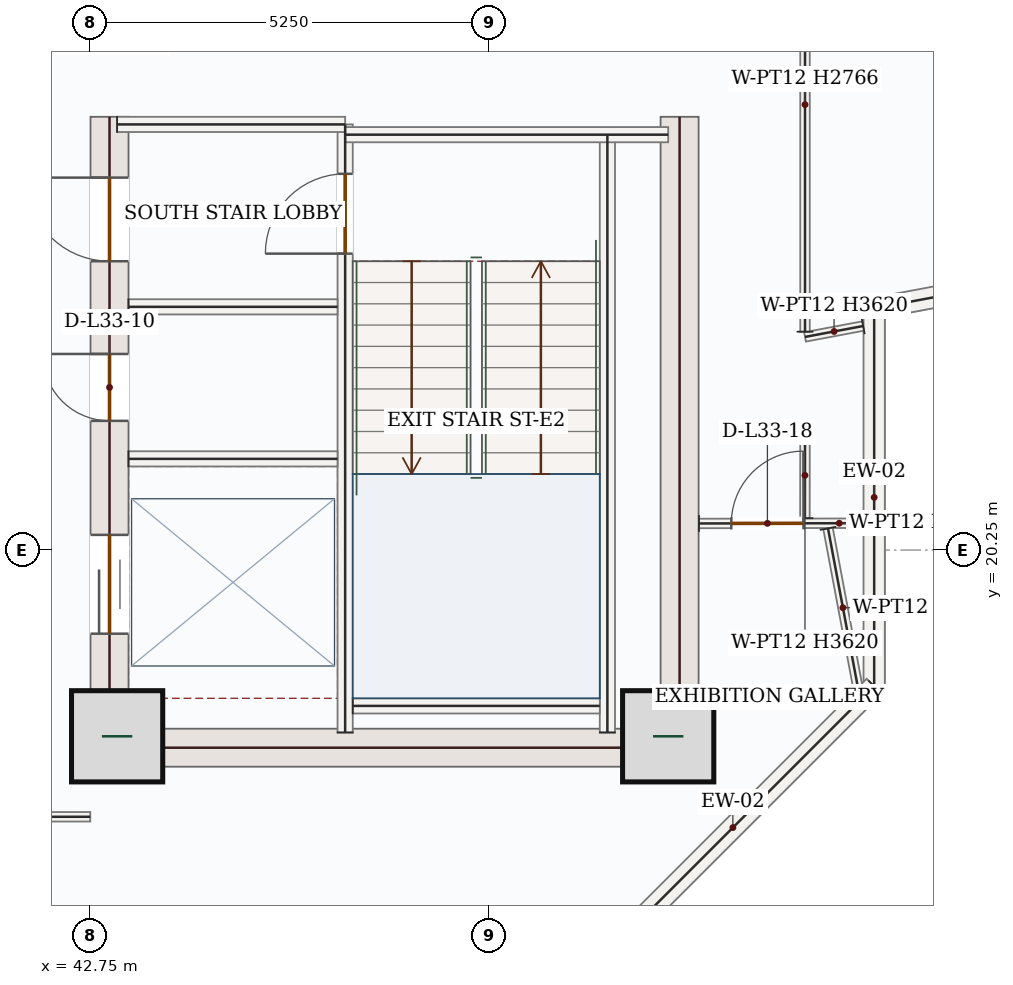
"""IFC4 building model, lengths in metres.
Left out: names, types, materials, properties, quantities, classifications, styles, units other than length and angle.
Written with IfcOpenShell. Run it as: python <this file> out.ifc"""

import sys

from ifc_helpers import new_model, si_unit, direction, frame, frame_2d, origin, origin_2d, place, context, subcontext, project, spatial, rectangle, extrude, source, transform, mapped, element, fill, save


model = new_model("IFC4")
c1 = context("Model", 3, precision=1e-05, world=origin(), true_north=direction((0.0, 1.0)))
c2 = subcontext(c1, "Body", "Model", "MODEL_VIEW")
j1 = project(units=[si_unit("LENGTHUNIT", "METRE"), si_unit("PLANEANGLEUNIT", "RADIAN")], contexts=[c1])
p1 = place(None, origin())
s1 = spatial("IfcSite", under=j1, at=p1, CompositionType="ELEMENT")
p2 = place(p1, origin())
s2 = spatial("IfcBuilding", under=s1, at=p2, CompositionType="ELEMENT")
p3 = place(p2, frame((0.0, 0.0, 147.3)))
s3 = spatial("IfcBuildingStorey", under=s2, at=p3, CompositionType="ELEMENT", Elevation=147.3)
p4 = place(p3, frame((43.0, 17.4, 0.0), z_axis=(0.0, 0.0, 1.0), x_axis=(0.0, 1.0, 0.0)))
e1 = element("IfcWall", 1, at=p4, inside=s3, PredefinedType="SHEAR", context=c2, shape_type="SweptSolid", body=[
    extrude(rectangle(XDim=8.55, YDim=0.5, at=frame_2d((4.275, 0.0))), origin(), (0.0, 0.0, 1.0), 3.62),
])
p5 = place(p4, frame((6.65, 0.0, 0.0)))
e2 = element("IfcOpeningElement", 2, at=p5, cuts=e1, PredefinedType="OPENING", context=c2, shape_type="SweptSolid", body=[
    extrude(rectangle(XDim=1.1, YDim=2.2, at=frame_2d((0.55, 1.1))), frame((0.0, 0.26, 0.0), z_axis=(0.0, -1.0, 0.0), x_axis=(1.0, 0.0, 0.0)), (0.0, 0.0, 1.0), 0.52),
])
p6 = place(p4, frame((1.75, 0.0, 0.0)))
e3 = element("IfcOpeningElement", 3, at=p6, cuts=e1, PredefinedType="OPENING", context=c2, shape_type="SweptSolid", body=[
    extrude(rectangle(XDim=1.3, YDim=2.2, at=frame_2d((0.65, 1.1))), frame((0.0, 0.26, 0.0), z_axis=(0.0, -1.0, 0.0), x_axis=(1.0, 0.0, 0.0)), (0.0, 0.0, 1.0), 0.52),
])
p7 = place(p4, frame((4.55, 0.0, 0.0)))
e4 = element("IfcOpeningElement", 4, at=p7, cuts=e1, PredefinedType="OPENING", context=c2, shape_type="SweptSolid", body=[
    extrude(rectangle(XDim=0.88, YDim=2.1, at=frame_2d((0.44, 1.05))), frame((0.0, 0.26, 0.0), z_axis=(0.0, -1.0, 0.0), x_axis=(1.0, 0.0, 0.0)), (0.0, 0.0, 1.0), 0.52),
])
m1 = source(origin(), c2, "Body", "SweptSolid", [
    extrude(rectangle(XDim=8.55, YDim=0.5, at=frame_2d((4.275, 0.0))), origin(), (0.0, 0.0, 1.0), 3.62),
])
p8 = place(p3, frame((50.5, 17.4, 0.0), z_axis=(0.0, 0.0, 1.0), x_axis=(0.0, 1.0, 0.0)))
e5 = element("IfcWall", 5, at=p8, inside=s3, PredefinedType="SHEAR", context=c2, shape_type="MappedRepresentation", body=[
    mapped(m1, transform((0.0, 0.0, 0.0), x_axis=(1.0, 0.0, 0.0), y_axis=(0.0, 1.0, 0.0), z_axis=(0.0, 0.0, 1.0), scale=1.0)),
])
m2 = source(origin(), c2, "Body", "SweptSolid", [
    extrude(rectangle(XDim=7.0, YDim=0.5, at=frame_2d((3.5, 0.0))), origin(), (0.0, 0.0, 1.0), 3.62),
])
p9 = place(p3, frame((43.25, 17.65, 0.0), z_axis=(0.0, 0.0, 1.0), x_axis=(1.0, 0.0, 0.0)))
e6 = element("IfcWall", 6, at=p9, inside=s3, PredefinedType="SHEAR", context=c2, shape_type="MappedRepresentation", body=[
    mapped(m2, transform((0.0, 0.0, 0.0), x_axis=(1.0, 0.0, 0.0), y_axis=(0.0, 1.0, 0.0), z_axis=(0.0, 0.0, 1.0), scale=1.0)),
])
m3 = source(origin(), c2, "Body", "SweptSolid", [
    extrude(rectangle(XDim=1.2, YDim=1.2, at=origin_2d()), origin(), (0.0, 0.0, 1.0), 3.9),
])
for number, where, z_axis, x_axis in (
    (7, (43.1, 17.8, 0.0), (0.0, 0.0, 1.0), (1.0, 0.0, 0.0)),
    (8, (50.35, 17.8, 0.0), (0.0, 0.0, 1.0), (1.0, 0.0, 0.0)),
):
    element("IfcColumn", number, at=place(p3, frame(where, z_axis=z_axis, x_axis=x_axis)), inside=s3, PredefinedType="COLUMN", context=c2, shape_type="MappedRepresentation", body=[
        mapped(m3, transform((0.0, 0.0, 0.0), x_axis=(1.0, 0.0, 0.0), y_axis=(0.0, 1.0, 0.0), z_axis=(0.0, 0.0, 1.0), scale=1.0)),
    ])
p10 = place(p3, frame((61.957, 25.1, 0.0), z_axis=(0.0, 0.0, 1.0), x_axis=(-0.982808012228, -0.184630471755, 0.0)))
e9 = element("IfcWall", 9, at=p10, inside=s3, PredefinedType="SOLIDWALL", context=c2, shape_type="SweptSolid", body=[
    extrude(rectangle(XDim=9.052, YDim=0.28, at=frame_2d((4.526, 0.0))), origin(), (0.0, 0.0, 1.0), 3.62),
])
p11 = place(p10, frame((3.626, 0.0, 0.85)))
e10 = element("IfcOpeningElement", 10, at=p11, cuts=e9, PredefinedType="OPENING", context=c2, shape_type="SweptSolid", body=[
    extrude(rectangle(XDim=1.8, YDim=1.75, at=frame_2d((0.9, 0.875))), frame((0.0, 0.15, 0.0), z_axis=(0.0, -1.0, 0.0), x_axis=(1.0, 0.0, 0.0)), (0.0, 0.0, 1.0), 0.3),
])
m4 = source(origin(), c2, "Body", "SweptSolid", [
    extrude(rectangle(XDim=4.97, YDim=0.28, at=frame_2d((2.485, 0.0))), origin(), (0.0, 0.0, 1.0), 3.62),
])
p12 = place(p3, frame((53.06, 23.428, 0.0), z_axis=(0.0, 0.0, 1.0), x_axis=(0.0, -1.0, 0.0)))
e11 = element("IfcWall", 11, at=p12, inside=s3, PredefinedType="SOLIDWALL", context=c2, shape_type="MappedRepresentation", body=[
    mapped(m4, transform((0.0, 0.0, 0.0), x_axis=(1.0, 0.0, 0.0), y_axis=(0.0, 1.0, 0.0), z_axis=(0.0, 0.0, 1.0), scale=1.0)),
])
m5 = source(origin(), c2, "Body", "SweptSolid", [
    extrude(rectangle(XDim=5.258, YDim=0.28, at=frame_2d((2.629, 0.0))), origin(), (0.0, 0.0, 1.0), 3.62),
])
p13 = place(p3, frame((53.06, 18.458, 0.0), z_axis=(0.0, 0.0, 1.0), x_axis=(-0.707106781187, -0.707106781187, 0.0)))
e12 = element("IfcWall", 12, at=p13, inside=s3, PredefinedType="SOLIDWALL", context=c2, shape_type="MappedRepresentation", body=[
    mapped(m5, transform((0.0, 0.0, 0.0), x_axis=(1.0, 0.0, 0.0), y_axis=(0.0, 1.0, 0.0), z_axis=(0.0, 0.0, 1.0), scale=1.0)),
])
m6 = source(origin(), c2, "Body", "SweptSolid", [
    extrude(rectangle(XDim=7.87, YDim=0.2, at=frame_2d((3.935, 0.0))), origin(), (0.0, 0.0, 1.0), 3.62),
])
p14 = place(p3, frame((49.55, 17.85, 0.0), z_axis=(0.0, 0.0, 1.0), x_axis=(0.0, 1.0, 0.0)))
e13 = element("IfcWall", 13, at=p14, inside=s3, PredefinedType="SOLIDWALL", context=c2, shape_type="MappedRepresentation", body=[
    mapped(m6, transform((0.0, 0.0, 0.0), x_axis=(1.0, 0.0, 0.0), y_axis=(0.0, 1.0, 0.0), z_axis=(0.0, 0.0, 1.0), scale=1.0)),
])
p15 = place(p3, frame((46.1, 17.85, 0.0), z_axis=(0.0, 0.0, 1.0), x_axis=(0.0, 1.0, 0.0)))
e14 = element("IfcWall", 14, at=p15, inside=s3, PredefinedType="SOLIDWALL", context=c2, shape_type="SweptSolid", body=[
    extrude(rectangle(XDim=8.0, YDim=0.2, at=frame_2d((4.0, 0.0))), origin(), (0.0, 0.0, 1.0), 3.62),
])
p16 = place(p15, frame((6.3, 0.0, 0.0)))
e15 = element("IfcOpeningElement", 15, at=p16, cuts=e14, PredefinedType="OPENING", context=c2, shape_type="SweptSolid", body=[
    extrude(rectangle(XDim=1.05, YDim=2.15, at=frame_2d((0.525, 1.075))), frame((0.0, 0.11, 0.0), z_axis=(0.0, -1.0, 0.0), x_axis=(1.0, 0.0, 0.0)), (0.0, 0.0, 1.0), 0.22),
])
m7 = source(origin(), c2, "Body", "SweptSolid", [
    extrude(rectangle(XDim=3.0, YDim=0.2, at=frame_2d((1.5, 0.0))), origin(), (0.0, 0.0, 1.0), 3.62),
])
p17 = place(p3, frame((43.1, 25.85, 0.0), z_axis=(0.0, 0.0, 1.0), x_axis=(1.0, 0.0, 0.0)))
e16 = element("IfcWall", 16, at=p17, inside=s3, PredefinedType="SOLIDWALL", context=c2, shape_type="MappedRepresentation", body=[
    mapped(m7, transform((0.0, 0.0, 0.0), x_axis=(1.0, 0.0, 0.0), y_axis=(0.0, 1.0, 0.0), z_axis=(0.0, 0.0, 1.0), scale=1.0)),
])
m8 = source(origin(), c2, "Body", "SweptSolid", [
    extrude(rectangle(XDim=4.25, YDim=0.2, at=frame_2d((2.125, 0.0))), origin(), (0.0, 0.0, 1.0), 3.62),
])
p18 = place(p3, frame((46.1, 25.715, 0.0), z_axis=(0.0, 0.0, 1.0), x_axis=(1.0, 0.0, 0.0)))
e17 = element("IfcWall", 17, at=p18, inside=s3, PredefinedType="SOLIDWALL", context=c2, shape_type="MappedRepresentation", body=[
    mapped(m8, transform((0.0, 0.0, 0.0), x_axis=(1.0, 0.0, 0.0), y_axis=(0.0, 1.0, 0.0), z_axis=(0.0, 0.0, 1.0), scale=1.0)),
])
m9 = source(origin(), c2, "Body", "SweptSolid", [
    extrude(rectangle(XDim=3.25, YDim=0.2, at=frame_2d((1.625, 0.0))), origin(), (0.0, 0.0, 1.0), 3.62),
])
p19 = place(p3, frame((46.2, 18.2, 0.0), z_axis=(0.0, 0.0, 1.0), x_axis=(1.0, 0.0, 0.0)))
e18 = element("IfcWall", 18, at=p19, inside=s3, PredefinedType="SOLIDWALL", context=c2, shape_type="MappedRepresentation", body=[
    mapped(m9, transform((0.0, 0.0, 0.0), x_axis=(1.0, 0.0, 0.0), y_axis=(0.0, 1.0, 0.0), z_axis=(0.0, 0.0, 1.0), scale=1.0)),
])
m10 = source(origin(), c2, "Body", "SweptSolid", [
    extrude(rectangle(XDim=2.75, YDim=0.2, at=frame_2d((1.375, 0.0))), origin(), (0.0, 0.0, 1.0), 3.62),
])
for number, where, z_axis, x_axis in (
    (19, (43.25, 23.45, 0.0), (0.0, 0.0, 1.0), (1.0, 0.0, 0.0)),
    (20, (43.25, 21.45, 0.0), (0.0, 0.0, 1.0), (1.0, 0.0, 0.0)),
):
    element("IfcWall", number, at=place(p3, frame(where, z_axis=z_axis, x_axis=x_axis)), inside=s3, PredefinedType="SOLIDWALL", context=c2, shape_type="MappedRepresentation", body=[
        mapped(m10, transform((0.0, 0.0, 0.0), x_axis=(1.0, 0.0, 0.0), y_axis=(0.0, 1.0, 0.0), z_axis=(0.0, 0.0, 1.0), scale=1.0)),
    ])
p20 = place(p3, frame((50.755, 20.6, 0.0), z_axis=(0.0, 0.0, 1.0), x_axis=(0.99999875384, 0.001578708001, 0.0)))
e21 = element("IfcWall", 21, at=p20, inside=s3, PredefinedType="PARTITIONING", context=c2, shape_type="SweptSolid", body=[
    extrude(rectangle(XDim=2.165, YDim=0.125, at=frame_2d((1.083, 0.0))), origin(), (0.0, 0.0, 1.0), 3.62),
])
p21 = place(p20, frame((0.425, 0.0, 0.0)))
e22 = element("IfcOpeningElement", 22, at=p21, cuts=e21, PredefinedType="OPENING", context=c2, shape_type="SweptSolid", body=[
    extrude(rectangle(XDim=0.95, YDim=2.15, at=frame_2d((0.475, 1.075))), frame((0.0, 0.073, 0.0), z_axis=(0.0, -1.0, 0.0), x_axis=(1.0, 0.0, 0.0)), (0.0, 0.0, 1.0), 0.145),
])
m11 = source(origin(), c2, "Body", "SweptSolid", [
    extrude(rectangle(XDim=1.127, YDim=0.125, at=frame_2d((0.563, 0.0))), origin(), (0.0, 0.0, 1.0), 3.62),
])
p22 = place(p3, frame((52.149, 20.67, 0.0), z_axis=(0.0, 0.0, 1.0), x_axis=(0.001083188273, 0.999999413351, 0.0)))
e23 = element("IfcWall", 23, at=p22, inside=s3, PredefinedType="PARTITIONING", context=c2, shape_type="MappedRepresentation", body=[
    mapped(m11, transform((0.0, 0.0, 0.0), x_axis=(1.0, 0.0, 0.0), y_axis=(0.0, 1.0, 0.0), z_axis=(0.0, 0.0, 1.0), scale=1.0)),
])
m12 = source(origin(), c2, "Body", "SweptSolid", [
    extrude(rectangle(XDim=2.124, YDim=0.125, at=frame_2d((1.062, 0.0))), origin(), (0.0, 0.0, 1.0), 3.62),
])
p23 = place(p3, frame((52.452, 20.535, 0.0), z_axis=(0.0, 0.0, 1.0), x_axis=(0.184697942122, -0.982795334836, 0.0)))
e24 = element("IfcWall", 24, at=p23, inside=s3, PredefinedType="PARTITIONING", context=c2, shape_type="MappedRepresentation", body=[
    mapped(m12, transform((0.0, 0.0, 0.0), x_axis=(1.0, 0.0, 0.0), y_axis=(0.0, 1.0, 0.0), z_axis=(0.0, 0.0, 1.0), scale=1.0)),
])
m13 = source(origin(), c2, "Body", "SweptSolid", [
    extrude(rectangle(XDim=0.779, YDim=0.125, at=frame_2d((0.389, 0.0))), origin(), (0.0, 0.0, 1.0), 3.62),
])
p24 = place(p3, frame((52.915, 23.198, 0.0), z_axis=(0.0, 0.0, 1.0), x_axis=(-0.982850878619, -0.184402143149, 0.0)))
e25 = element("IfcWall", 25, at=p24, inside=s3, PredefinedType="PARTITIONING", context=c2, shape_type="MappedRepresentation", body=[
    mapped(m13, transform((0.0, 0.0, 0.0), x_axis=(1.0, 0.0, 0.0), y_axis=(0.0, 1.0, 0.0), z_axis=(0.0, 0.0, 1.0), scale=1.0)),
])
m14 = source(origin(), c2, "Body", "SweptSolid", [
    extrude(rectangle(XDim=5.975, YDim=0.125, at=frame_2d((2.988, 0.0))), origin(), (0.0, 0.0, 1.0), 2.766),
])
p25 = place(p3, frame((52.15, 23.123, 0.0), z_axis=(0.0, 0.0, 1.0), x_axis=(0.0, 1.0, 0.0)))
e26 = element("IfcWall", 26, at=p25, inside=s3, PredefinedType="PARTITIONING", context=c2, shape_type="MappedRepresentation", body=[
    mapped(m14, transform((0.0, 0.0, 0.0), x_axis=(1.0, 0.0, 0.0), y_axis=(0.0, 1.0, 0.0), z_axis=(0.0, 0.0, 1.0), scale=1.0)),
])
m15 = source(origin(), c2, "Body", "SweptSolid", [
    extrude(rectangle(XDim=3.814, YDim=0.125, at=frame_2d((1.907, 0.0))), origin(), (0.0, 0.0, 1.0), 3.149),
])
p26 = place(p3, frame((38.932, 16.74, 0.0), z_axis=(0.0, 0.0, 1.0), x_axis=(0.999999948787, 0.000320040949, 0.0)))
e27 = element("IfcWall", 27, at=p26, inside=s3, PredefinedType="PARTITIONING", context=c2, shape_type="MappedRepresentation", body=[
    mapped(m15, transform((0.0, 0.0, 0.0), x_axis=(1.0, 0.0, 0.0), y_axis=(0.0, 1.0, 0.0), z_axis=(0.0, 0.0, 1.0), scale=1.0)),
])
m16 = source(origin(), c2, "Body", "SweptSolid", [
    extrude(rectangle(XDim=1.05, YDim=2.15, at=frame_2d((0.525, 1.075))), frame((0.0, 0.025, 0.0), z_axis=(0.0, -1.0, 0.0), x_axis=(1.0, 0.0, 0.0)), (0.0, 0.0, 1.0), 0.05),
])
p27 = place(p16, origin())
e28 = element("IfcDoor", 28, at=p27, inside=s3, OperationType="SINGLE_SWING_LEFT", PredefinedType="DOOR", context=c2, shape_type="MappedRepresentation", body=[
    mapped(m16, transform((0.0, 0.0, 0.0), x_axis=(1.0, 0.0, 0.0), y_axis=(0.0, 1.0, 0.0), z_axis=(0.0, 0.0, 1.0), scale=1.0)),
])
fill(e15, e28)
m17 = source(origin(), c2, "Body", "SweptSolid", [
    extrude(rectangle(XDim=1.1, YDim=2.2, at=frame_2d((0.55, 1.1))), frame((0.0, 0.025, 0.0), z_axis=(0.0, -1.0, 0.0), x_axis=(1.0, 0.0, 0.0)), (0.0, 0.0, 1.0), 0.05),
])
p28 = place(p5, origin())
e29 = element("IfcDoor", 29, at=p28, inside=s3, OperationType="SINGLE_SWING_RIGHT", PredefinedType="DOOR", context=c2, shape_type="MappedRepresentation", body=[
    mapped(m17, transform((0.0, 0.0, 0.0), x_axis=(1.0, 0.0, 0.0), y_axis=(0.0, 1.0, 0.0), z_axis=(0.0, 0.0, 1.0), scale=1.0)),
])
fill(e2, e29)
m18 = source(origin(), c2, "Body", "SweptSolid", [
    extrude(rectangle(XDim=1.3, YDim=2.2, at=frame_2d((0.65, 1.1))), frame((0.0, 0.025, 0.0), z_axis=(0.0, -1.0, 0.0), x_axis=(1.0, 0.0, 0.0)), (0.0, 0.0, 1.0), 0.05),
])
p29 = place(p6, origin())
e30 = element("IfcDoor", 30, at=p29, inside=s3, OperationType="DOUBLE_DOOR_SLIDING", PredefinedType="DOOR", context=c2, shape_type="MappedRepresentation", body=[
    mapped(m18, transform((0.0, 0.0, 0.0), x_axis=(1.0, 0.0, 0.0), y_axis=(0.0, 1.0, 0.0), z_axis=(0.0, 0.0, 1.0), scale=1.0)),
])
fill(e3, e30)
m19 = source(origin(), c2, "Body", "SweptSolid", [
    extrude(rectangle(XDim=0.88, YDim=2.1, at=frame_2d((0.44, 1.05))), frame((0.0, 0.025, 0.0), z_axis=(0.0, -1.0, 0.0), x_axis=(1.0, 0.0, 0.0)), (0.0, 0.0, 1.0), 0.05),
])
p30 = place(p7, origin())
e31 = element("IfcDoor", 31, at=p30, inside=s3, OperationType="SINGLE_SWING_RIGHT", PredefinedType="DOOR", context=c2, shape_type="MappedRepresentation", body=[
    mapped(m19, transform((0.0, 0.0, 0.0), x_axis=(1.0, 0.0, 0.0), y_axis=(0.0, 1.0, 0.0), z_axis=(0.0, 0.0, 1.0), scale=1.0)),
])
fill(e4, e31)
m20 = source(origin(), c2, "Body", "SweptSolid", [
    extrude(rectangle(XDim=0.95, YDim=2.15, at=frame_2d((0.475, 1.075))), frame((0.0, 0.025, 0.0), z_axis=(0.0, -1.0, 0.0), x_axis=(1.0, 0.0, 0.0)), (0.0, 0.0, 1.0), 0.05),
])
p31 = place(p21, origin())
e32 = element("IfcDoor", 32, at=p31, inside=s3, OperationType="SINGLE_SWING_RIGHT", PredefinedType="DOOR", context=c2, shape_type="MappedRepresentation", body=[
    mapped(m20, transform((0.0, 0.0, 0.0), x_axis=(1.0, 0.0, 0.0), y_axis=(0.0, 1.0, 0.0), z_axis=(0.0, 0.0, 1.0), scale=1.0)),
])
fill(e22, e32)
save(model, sys.argv[1])
